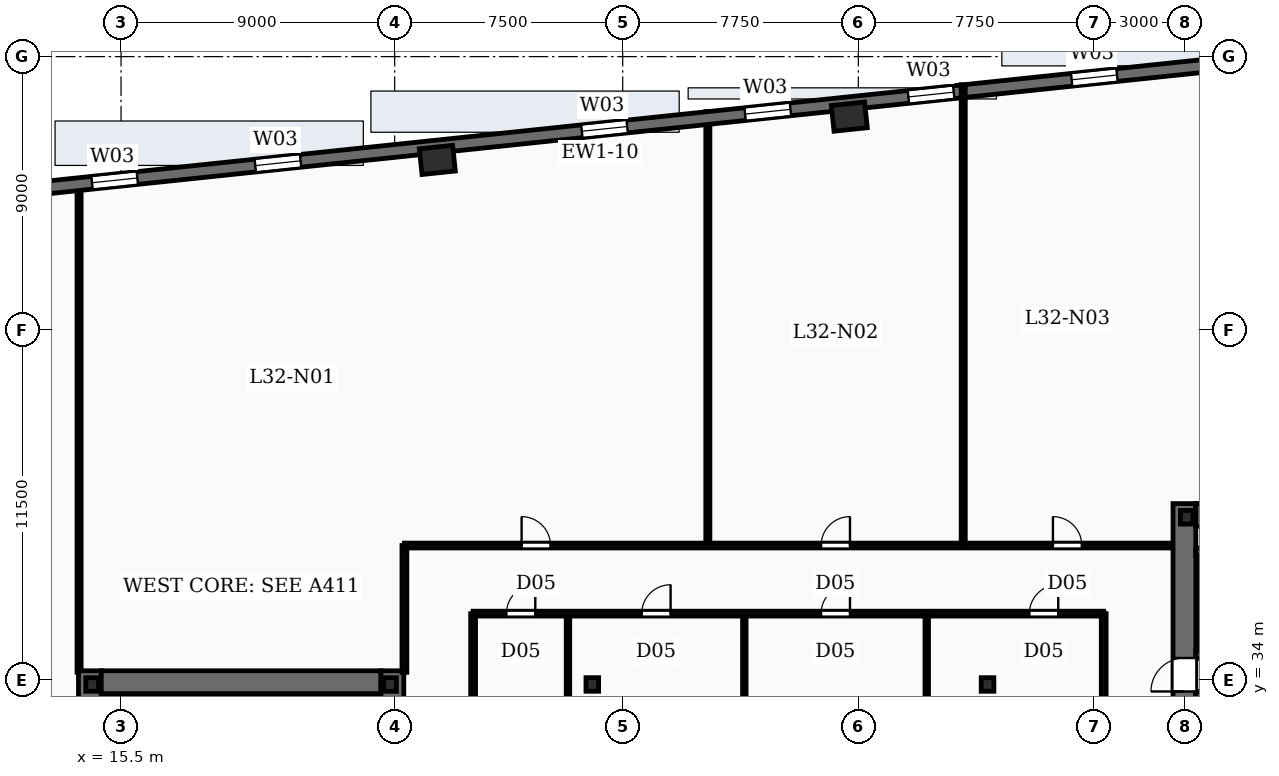
"""IFC4 building model, lengths in metres.
Left out: names, types, materials, properties, quantities, classifications, styles, units other than length and angle.
Written with IfcOpenShell. Run it as: python <this file> out.ifc"""

import sys

from ifc_helpers import new_model, si_unit, direction, frame, frame_2d, origin, origin_2d, place, context, subcontext, project, spatial, rectangle, i_section, extrude, element, fill, save


model = new_model("IFC4")
c1 = context("Model", 3, precision=1e-05, world=origin(), true_north=direction((0.0, 1.0)))
c2 = subcontext(c1, "Body", "Model", "MODEL_VIEW")
j1 = project(units=[si_unit("LENGTHUNIT", "METRE"), si_unit("PLANEANGLEUNIT", "RADIAN")], contexts=[c1])
p1 = place(None, origin())
s1 = spatial("IfcSite", under=j1, at=p1, CompositionType="ELEMENT")
p2 = place(p1, origin())
s2 = spatial("IfcBuilding", under=s1, at=p2, CompositionType="ELEMENT")
p3 = place(p2, frame((0.0, 0.0, 138.25)))
s3 = spatial("IfcBuildingStorey", under=s2, at=p3, CompositionType="ELEMENT", Elevation=138.25)
p4 = place(p3, frame((14.475, 19.0, -0.27), z_axis=(0.0, 0.0, 1.0), x_axis=(0.0, 1.0, 0.0)))
e1 = element("IfcWall", 1, at=p4, inside=s3, PredefinedType="SHEAR", context=c2, shape_type="SweptSolid", body=[
    extrude(rectangle(XDim=15.3, YDim=0.75, at=frame_2d((7.65, 0.0))), origin(), (0.0, 0.0, 1.0), 3.75),
])
p5 = place(p3, frame((24.425, 19.0, -0.27), z_axis=(0.0, 0.0, 1.0), x_axis=(0.0, 1.0, 0.0)))
e2 = element("IfcWall", 2, at=p5, inside=s3, PredefinedType="SHEAR", context=c2, shape_type="SweptSolid", body=[
    extrude(rectangle(XDim=15.3, YDim=0.75, at=frame_2d((7.65, 0.0))), origin(), (0.0, 0.0, 1.0), 3.75),
])
p6 = place(p5, frame((2.5, 0.0, 0.27)))
e3 = element("IfcOpeningElement", 3, at=p6, cuts=e2, PredefinedType="OPENING", context=c2, shape_type="SweptSolid", body=[
    extrude(rectangle(XDim=1.05, YDim=2.15, at=frame_2d((0.525, 1.075))), frame((0.0, 0.385, 0.0), z_axis=(0.0, -1.0, 0.0), x_axis=(1.0, 0.0, 0.0)), (0.0, 0.0, 1.0), 0.77),
])
p7 = place(p5, frame((7.0, 0.0, 0.27)))
e4 = element("IfcOpeningElement", 4, at=p7, cuts=e2, PredefinedType="OPENING", context=c2, shape_type="SweptSolid", body=[
    extrude(rectangle(XDim=1.05, YDim=2.15, at=frame_2d((0.525, 1.075))), frame((0.0, 0.385, 0.0), z_axis=(0.0, -1.0, 0.0), x_axis=(1.0, 0.0, 0.0)), (0.0, 0.0, 1.0), 0.77),
])
p8 = place(p3, frame((14.85, 33.925, -0.27), z_axis=(0.0, 0.0, 1.0), x_axis=(1.0, 0.0, 0.0)))
e5 = element("IfcWall", 5, at=p8, inside=s3, PredefinedType="SHEAR", context=c2, shape_type="SweptSolid", body=[
    extrude(rectangle(XDim=9.2, YDim=0.75, at=frame_2d((4.6, 0.0))), origin(), (0.0, 0.0, 1.0), 3.75),
])
p9 = place(p3, frame((50.475, 19.0, -0.27), z_axis=(0.0, 0.0, 1.0), x_axis=(0.0, 1.0, 0.0)))
e6 = element("IfcWall", 6, at=p9, inside=s3, PredefinedType="SHEAR", context=c2, shape_type="SweptSolid", body=[
    extrude(rectangle(XDim=20.8, YDim=0.75, at=frame_2d((10.4, 0.0))), origin(), (0.0, 0.0, 1.0), 3.75),
])
p10 = place(p9, frame((2.5, 0.0, 0.27)))
e7 = element("IfcOpeningElement", 7, at=p10, cuts=e6, PredefinedType="OPENING", context=c2, shape_type="SweptSolid", body=[
    extrude(rectangle(XDim=1.05, YDim=2.15, at=frame_2d((0.525, 1.075))), frame((0.0, 0.385, 0.0), z_axis=(0.0, -1.0, 0.0), x_axis=(1.0, 0.0, 0.0)), (0.0, 0.0, 1.0), 0.77),
])
p11 = place(p9, frame((8.65, 0.0, 0.27)))
e8 = element("IfcOpeningElement", 8, at=p11, cuts=e6, PredefinedType="OPENING", context=c2, shape_type="SweptSolid", body=[
    extrude(rectangle(XDim=1.05, YDim=2.15, at=frame_2d((0.525, 1.075))), frame((0.0, 0.385, 0.0), z_axis=(0.0, -1.0, 0.0), x_axis=(1.0, 0.0, 0.0)), (0.0, 0.0, 1.0), 0.77),
])
p12 = place(p9, frame((14.62, 0.0, 0.27)))
e9 = element("IfcOpeningElement", 9, at=p12, cuts=e6, PredefinedType="OPENING", context=c2, shape_type="SweptSolid", body=[
    extrude(rectangle(XDim=1.1, YDim=2.15, at=frame_2d((0.55, 1.075))), frame((0.0, 0.385, 0.0), z_axis=(0.0, -1.0, 0.0), x_axis=(1.0, 0.0, 0.0)), (0.0, 0.0, 1.0), 0.77),
])
p13 = place(p3, frame((50.85, 39.425, -0.27), z_axis=(0.0, 0.0, 1.0), x_axis=(1.0, 0.0, 0.0)))
e10 = element("IfcWall", 10, at=p13, inside=s3, PredefinedType="SHEAR", context=c2, shape_type="SweptSolid", body=[
    extrude(rectangle(XDim=9.2, YDim=0.75, at=frame_2d((4.6, 0.0))), origin(), (0.0, 0.0, 1.0), 3.75),
])
for number, where, z_axis, x_axis in (
    (11, (14.55, 33.85, -0.27), (0.0, 0.0, 1.0), (1.0, 0.0, 0.0)),
    (12, (24.35, 33.85, -0.27), (0.0, 0.0, 1.0), (1.0, 0.0, 0.0)),
    (13, (50.55, 39.35, -0.27), (0.0, 0.0, 1.0), (1.0, 0.0, 0.0)),
    (14, (31.0, 33.85, -0.27), (0.0, 0.0, 1.0), (1.0, 0.0, 0.0)),
    (15, (44.0, 33.85, -0.27), (0.0, 0.0, 1.0), (1.0, 0.0, 0.0)),
):
    element("IfcColumn", number, at=place(p3, frame(where, z_axis=z_axis, x_axis=x_axis)), inside=s3, PredefinedType="COLUMN", context=c2, shape_type="SweptSolid", body=[
        extrude(i_section(OverallWidth=0.416, OverallDepth=0.446, WebThickness=0.039, FlangeThickness=0.063, FilletRadius=0.02, at=origin_2d()), origin(), (0.0, 0.0, 1.0), 3.75),
    ])
for number, where, z_axis, x_axis in (
    (16, (39.453, 52.527, -0.27), (0.0, 0.0, 1.0), (0.995, 0.105, 0.0)),
    (17, (25.903, 51.103, -0.27), (0.0, 0.0, 1.0), (0.995, 0.105, 0.0)),
):
    element("IfcColumn", number, at=place(p3, frame(where, z_axis=z_axis, x_axis=x_axis)), inside=s3, PredefinedType="COLUMN", context=c2, shape_type="SweptSolid", body=[
        extrude(rectangle(XDim=1.1, YDim=0.85, at=origin_2d()), origin(), (0.0, 0.0, 1.0), 3.75),
    ])
p14 = place(p3, frame((11.958, 50.08, 0.0), z_axis=(0.0, 0.0, 1.0), x_axis=(0.994521823388, 0.104529148113, 0.0)))
e18 = element("IfcWall", 18, at=p14, inside=s3, PredefinedType="SOLIDWALL", context=c2, shape_type="SweptSolid", body=[
    extrude(rectangle(XDim=55.2, YDim=0.42, at=frame_2d((27.6, 0.0))), origin(), (0.0, 0.0, 1.0), 3.48),
])
p15 = place(p14, frame((2.6, 0.0, 0.88)))
e19 = element("IfcOpeningElement", 19, at=p15, cuts=e18, PredefinedType="OPENING", context=c2, shape_type="SweptSolid", body=[
    extrude(rectangle(XDim=1.5, YDim=2.05, at=frame_2d((0.75, 1.025))), frame((0.0, 0.22, 0.0), z_axis=(0.0, -1.0, 0.0), x_axis=(1.0, 0.0, 0.0)), (0.0, 0.0, 1.0), 0.44),
])
p16 = place(p14, frame((8.0, 0.0, 0.88)))
e20 = element("IfcOpeningElement", 20, at=p16, cuts=e18, PredefinedType="OPENING", context=c2, shape_type="SweptSolid", body=[
    extrude(rectangle(XDim=1.5, YDim=2.05, at=frame_2d((0.75, 1.025))), frame((0.0, 0.22, 0.0), z_axis=(0.0, -1.0, 0.0), x_axis=(1.0, 0.0, 0.0)), (0.0, 0.0, 1.0), 0.44),
])
p17 = place(p14, frame((18.8, 0.0, 0.88)))
e21 = element("IfcOpeningElement", 21, at=p17, cuts=e18, PredefinedType="OPENING", context=c2, shape_type="SweptSolid", body=[
    extrude(rectangle(XDim=1.5, YDim=2.05, at=frame_2d((0.75, 1.025))), frame((0.0, 0.22, 0.0), z_axis=(0.0, -1.0, 0.0), x_axis=(1.0, 0.0, 0.0)), (0.0, 0.0, 1.0), 0.44),
])
p18 = place(p14, frame((24.2, 0.0, 0.88)))
e22 = element("IfcOpeningElement", 22, at=p18, cuts=e18, PredefinedType="OPENING", context=c2, shape_type="SweptSolid", body=[
    extrude(rectangle(XDim=1.5, YDim=2.05, at=frame_2d((0.75, 1.025))), frame((0.0, 0.22, 0.0), z_axis=(0.0, -1.0, 0.0), x_axis=(1.0, 0.0, 0.0)), (0.0, 0.0, 1.0), 0.44),
])
p19 = place(p14, frame((29.6, 0.0, 0.88)))
e23 = element("IfcOpeningElement", 23, at=p19, cuts=e18, PredefinedType="OPENING", context=c2, shape_type="SweptSolid", body=[
    extrude(rectangle(XDim=1.5, YDim=2.05, at=frame_2d((0.75, 1.025))), frame((0.0, 0.22, 0.0), z_axis=(0.0, -1.0, 0.0), x_axis=(1.0, 0.0, 0.0)), (0.0, 0.0, 1.0), 0.44),
])
p20 = place(p14, frame((35.0, 0.0, 0.88)))
e24 = element("IfcOpeningElement", 24, at=p20, cuts=e18, PredefinedType="OPENING", context=c2, shape_type="SweptSolid", body=[
    extrude(rectangle(XDim=1.5, YDim=2.05, at=frame_2d((0.75, 1.025))), frame((0.0, 0.22, 0.0), z_axis=(0.0, -1.0, 0.0), x_axis=(1.0, 0.0, 0.0)), (0.0, 0.0, 1.0), 0.44),
])
p21 = place(p14, frame((45.8, 0.0, 0.88)))
e25 = element("IfcOpeningElement", 25, at=p21, cuts=e18, PredefinedType="OPENING", context=c2, shape_type="SweptSolid", body=[
    extrude(rectangle(XDim=1.5, YDim=2.05, at=frame_2d((0.75, 1.025))), frame((0.0, 0.22, 0.0), z_axis=(0.0, -1.0, 0.0), x_axis=(1.0, 0.0, 0.0)), (0.0, 0.0, 1.0), 0.44),
])
p22 = place(p3, frame((50.85, 33.5, 0.0), z_axis=(0.0, 0.0, 1.0), x_axis=(1.0, 0.0, 0.0)))
e26 = element("IfcWall", 26, at=p22, inside=s3, PredefinedType="SOLIDWALL", context=c2, shape_type="SweptSolid", body=[
    extrude(rectangle(XDim=9.2, YDim=0.24, at=frame_2d((4.6, 0.0))), origin(), (0.0, 0.0, 1.0), 3.48),
])
p23 = place(p3, frame((60.05, 34.83, 0.0), z_axis=(0.0, 0.0, 1.0), x_axis=(-1.0, 0.0, 0.0)))
e27 = element("IfcWall", 27, at=p23, inside=s3, PredefinedType="SOLIDWALL", context=c2, shape_type="SweptSolid", body=[
    extrude(rectangle(XDim=9.2, YDim=0.24, at=frame_2d((4.6, 0.0))), origin(), (0.0, 0.0, 1.0), 3.48),
])
p24 = place(p23, frame((7.57, 0.0, 0.0)))
e28 = element("IfcOpeningElement", 28, at=p24, cuts=e27, PredefinedType="OPENING", context=c2, shape_type="SweptSolid", body=[
    extrude(rectangle(XDim=1.1, YDim=2.15, at=frame_2d((0.55, 1.075))), frame((0.0, 0.13, 0.0), z_axis=(0.0, -1.0, 0.0), x_axis=(1.0, 0.0, 0.0)), (0.0, 0.0, 1.0), 0.26),
])
p25 = place(p3, frame((50.85, 38.22, 0.0), z_axis=(0.0, 0.0, 1.0), x_axis=(1.0, 0.0, 0.0)))
e29 = element("IfcWall", 29, at=p25, inside=s3, PredefinedType="SOLIDWALL", context=c2, shape_type="SweptSolid", body=[
    extrude(rectangle(XDim=9.2, YDim=0.24, at=frame_2d((4.6, 0.0))), origin(), (0.0, 0.0, 1.0), 3.48),
])
p26 = place(p3, frame((51.06, 34.95, 0.0), z_axis=(0.0, 0.0, 1.0), x_axis=(0.0, 1.0, 0.0)))
e30 = element("IfcWall", 30, at=p26, inside=s3, PredefinedType="SOLIDWALL", context=c2, shape_type="SweptSolid", body=[
    extrude(rectangle(XDim=3.15, YDim=0.24, at=frame_2d((1.575, 0.0))), origin(), (0.0, 0.0, 1.0), 3.48),
])
p27 = place(p3, frame((19.6, 32.37, 0.0), z_axis=(0.0, 0.0, 1.0), x_axis=(0.0, 1.0, 0.0)))
e31 = element("IfcWall", 31, at=p27, inside=s3, PredefinedType="SOLIDWALL", context=c2, shape_type="SweptSolid", body=[
    extrude(rectangle(XDim=1.13, YDim=0.2, at=frame_2d((0.565, 0.0))), origin(), (0.0, 0.0, 1.0), 3.48),
])
p28 = place(p3, frame((34.8, 38.42, 0.0), z_axis=(0.0, 0.0, 1.0), x_axis=(0.0, 1.0, 0.0)))
e32 = element("IfcWall", 32, at=p28, inside=s3, PredefinedType="PARTITIONING", context=c2, shape_type="SweptSolid", body=[
    extrude(rectangle(XDim=14.271, YDim=0.135, at=frame_2d((7.136, 0.0))), origin(), (0.0, 0.0, 1.0), 2.54),
])
p29 = place(p3, frame((43.2, 38.42, 0.0), z_axis=(0.0, 0.0, 1.0), x_axis=(0.0, 1.0, 0.0)))
e33 = element("IfcWall", 33, at=p29, inside=s3, PredefinedType="PARTITIONING", context=c2, shape_type="SweptSolid", body=[
    extrude(rectangle(XDim=15.155, YDim=0.135, at=frame_2d((7.577, 0.0))), origin(), (0.0, 0.0, 1.0), 2.54),
])
p30 = place(p3, frame((24.82, 34.25, 0.0), z_axis=(0.0, 0.0, 1.0), x_axis=(0.0, 1.0, 0.0)))
e34 = element("IfcWall", 34, at=p30, inside=s3, PredefinedType="PARTITIONING", context=c2, shape_type="SweptSolid", body=[
    extrude(rectangle(XDim=4.17, YDim=0.16, at=frame_2d((2.085, 0.0))), origin(), (0.0, 0.0, 1.0), 2.54),
])
p31 = place(p3, frame((14.12, 34.25, 0.0), z_axis=(0.0, 0.0, 1.0), x_axis=(0.0, 1.0, 0.0)))
e35 = element("IfcWall", 35, at=p31, inside=s3, PredefinedType="PARTITIONING", context=c2, shape_type="SweptSolid", body=[
    extrude(rectangle(XDim=16.027, YDim=0.135, at=frame_2d((8.013, 0.0))), origin(), (0.0, 0.0, 1.0), 2.54),
])
p32 = place(p3, frame((24.82, 38.42, 0.0), z_axis=(0.0, 0.0, 1.0), x_axis=(1.0, 0.0, 0.0)))
e36 = element("IfcWall", 36, at=p32, inside=s3, PredefinedType="PARTITIONING", context=c2, shape_type="SweptSolid", body=[
    extrude(rectangle(XDim=25.26, YDim=0.16, at=frame_2d((12.63, 0.0))), origin(), (0.0, 0.0, 1.0), 2.54),
])
p33 = place(p32, frame((3.855, 0.0, 0.0)))
e37 = element("IfcOpeningElement", 37, at=p33, cuts=e36, PredefinedType="OPENING", context=c2, shape_type="SweptSolid", body=[
    extrude(rectangle(XDim=0.95, YDim=2.15, at=frame_2d((0.475, 1.075))), frame((0.0, 0.09, 0.0), z_axis=(0.0, -1.0, 0.0), x_axis=(1.0, 0.0, 0.0)), (0.0, 0.0, 1.0), 0.18),
])
p34 = place(p32, frame((13.705, 0.0, 0.0)))
e38 = element("IfcOpeningElement", 38, at=p34, cuts=e36, PredefinedType="OPENING", context=c2, shape_type="SweptSolid", body=[
    extrude(rectangle(XDim=0.95, YDim=2.15, at=frame_2d((0.475, 1.075))), frame((0.0, 0.09, 0.0), z_axis=(0.0, -1.0, 0.0), x_axis=(1.0, 0.0, 0.0)), (0.0, 0.0, 1.0), 0.18),
])
p35 = place(p32, frame((21.33, 0.0, 0.0)))
e39 = element("IfcOpeningElement", 39, at=p35, cuts=e36, PredefinedType="OPENING", context=c2, shape_type="SweptSolid", body=[
    extrude(rectangle(XDim=0.95, YDim=2.15, at=frame_2d((0.475, 1.075))), frame((0.0, 0.09, 0.0), z_axis=(0.0, -1.0, 0.0), x_axis=(1.0, 0.0, 0.0)), (0.0, 0.0, 1.0), 0.18),
])
for number, where, z_axis, x_axis in (
    (40, (30.2, 15.38, 0.0), (0.0, 0.0, 1.0), (0.0, 1.0, 0.0)),
    (41, (36.0, 15.38, 0.0), (0.0, 0.0, 1.0), (0.0, 1.0, 0.0)),
    (42, (42.0, 15.38, 0.0), (0.0, 0.0, 1.0), (0.0, 1.0, 0.0)),
):
    element("IfcWall", number, at=place(p3, frame(where, z_axis=z_axis, x_axis=x_axis)), inside=s3, PredefinedType="PARTITIONING", context=c2, shape_type="SweptSolid", body=[
        extrude(rectangle(XDim=20.8, YDim=0.115, at=frame_2d((10.4, 0.0))), origin(), (0.0, 0.0, 1.0), 2.54),
    ])
p36 = place(p3, frame((27.08, 36.18, 0.0), z_axis=(0.0, 0.0, 1.0), x_axis=(1.0, 0.0, 0.0)))
e43 = element("IfcWall", 43, at=p36, inside=s3, PredefinedType="PARTITIONING", context=c2, shape_type="SweptSolid", body=[
    extrude(rectangle(XDim=20.74, YDim=0.16, at=frame_2d((10.37, 0.0))), origin(), (0.0, 0.0, 1.0), 2.54),
])
p37 = place(p36, frame((1.095, 0.0, 0.0)))
e44 = element("IfcOpeningElement", 44, at=p37, cuts=e43, PredefinedType="OPENING", context=c2, shape_type="SweptSolid", body=[
    extrude(rectangle(XDim=0.95, YDim=2.15, at=frame_2d((0.475, 1.075))), frame((0.0, 0.09, 0.0), z_axis=(0.0, -1.0, 0.0), x_axis=(1.0, 0.0, 0.0)), (0.0, 0.0, 1.0), 0.18),
])
p38 = place(p36, frame((5.545, 0.0, 0.0)))
e45 = element("IfcOpeningElement", 45, at=p38, cuts=e43, PredefinedType="OPENING", context=c2, shape_type="SweptSolid", body=[
    extrude(rectangle(XDim=0.95, YDim=2.15, at=frame_2d((0.475, 1.075))), frame((0.0, 0.09, 0.0), z_axis=(0.0, -1.0, 0.0), x_axis=(1.0, 0.0, 0.0)), (0.0, 0.0, 1.0), 0.18),
])
p39 = place(p36, frame((11.445, 0.0, 0.0)))
e46 = element("IfcOpeningElement", 46, at=p39, cuts=e43, PredefinedType="OPENING", context=c2, shape_type="SweptSolid", body=[
    extrude(rectangle(XDim=0.95, YDim=2.15, at=frame_2d((0.475, 1.075))), frame((0.0, 0.09, 0.0), z_axis=(0.0, -1.0, 0.0), x_axis=(1.0, 0.0, 0.0)), (0.0, 0.0, 1.0), 0.18),
])
p40 = place(p36, frame((18.295, 0.0, 0.0)))
e47 = element("IfcOpeningElement", 47, at=p40, cuts=e43, PredefinedType="OPENING", context=c2, shape_type="SweptSolid", body=[
    extrude(rectangle(XDim=0.95, YDim=2.15, at=frame_2d((0.475, 1.075))), frame((0.0, 0.09, 0.0), z_axis=(0.0, -1.0, 0.0), x_axis=(1.0, 0.0, 0.0)), (0.0, 0.0, 1.0), 0.18),
])
for number, where, z_axis, x_axis in (
    (48, (27.08, 15.38, 0.0), (0.0, 0.0, 1.0), (0.0, 1.0, 0.0)),
    (49, (47.82, 15.38, 0.0), (0.0, 0.0, 1.0), (0.0, 1.0, 0.0)),
):
    element("IfcWall", number, at=place(p3, frame(where, z_axis=z_axis, x_axis=x_axis)), inside=s3, PredefinedType="PARTITIONING", context=c2, shape_type="SweptSolid", body=[
        extrude(rectangle(XDim=20.8, YDim=0.16, at=frame_2d((10.4, 0.0))), origin(), (0.0, 0.0, 1.0), 2.54),
    ])
p41 = place(p15, origin())
e50 = element("IfcWindow", 50, at=p41, inside=s3, PartitioningType="SINGLE_PANEL", PredefinedType="WINDOW", context=c2, shape_type="SweptSolid", body=[
    extrude(rectangle(XDim=1.5, YDim=2.05, at=frame_2d((0.75, 1.025))), frame((0.0, 0.03, 0.0), z_axis=(0.0, -1.0, 0.0), x_axis=(1.0, 0.0, 0.0)), (0.0, 0.0, 1.0), 0.06),
])
fill(e19, e50)
p42 = place(p16, origin())
e51 = element("IfcWindow", 51, at=p42, inside=s3, PartitioningType="SINGLE_PANEL", PredefinedType="WINDOW", context=c2, shape_type="SweptSolid", body=[
    extrude(rectangle(XDim=1.5, YDim=2.05, at=frame_2d((0.75, 1.025))), frame((0.0, 0.03, 0.0), z_axis=(0.0, -1.0, 0.0), x_axis=(1.0, 0.0, 0.0)), (0.0, 0.0, 1.0), 0.06),
])
fill(e20, e51)
p43 = place(p17, origin())
e52 = element("IfcWindow", 52, at=p43, inside=s3, PartitioningType="SINGLE_PANEL", PredefinedType="WINDOW", context=c2, shape_type="SweptSolid", body=[
    extrude(rectangle(XDim=1.5, YDim=2.05, at=frame_2d((0.75, 1.025))), frame((0.0, 0.03, 0.0), z_axis=(0.0, -1.0, 0.0), x_axis=(1.0, 0.0, 0.0)), (0.0, 0.0, 1.0), 0.06),
])
fill(e21, e52)
p44 = place(p18, origin())
e53 = element("IfcWindow", 53, at=p44, inside=s3, PartitioningType="SINGLE_PANEL", PredefinedType="WINDOW", context=c2, shape_type="SweptSolid", body=[
    extrude(rectangle(XDim=1.5, YDim=2.05, at=frame_2d((0.75, 1.025))), frame((0.0, 0.03, 0.0), z_axis=(0.0, -1.0, 0.0), x_axis=(1.0, 0.0, 0.0)), (0.0, 0.0, 1.0), 0.06),
])
fill(e22, e53)
p45 = place(p19, origin())
e54 = element("IfcWindow", 54, at=p45, inside=s3, PartitioningType="SINGLE_PANEL", PredefinedType="WINDOW", context=c2, shape_type="SweptSolid", body=[
    extrude(rectangle(XDim=1.5, YDim=2.05, at=frame_2d((0.75, 1.025))), frame((0.0, 0.03, 0.0), z_axis=(0.0, -1.0, 0.0), x_axis=(1.0, 0.0, 0.0)), (0.0, 0.0, 1.0), 0.06),
])
fill(e23, e54)
p46 = place(p20, origin())
e55 = element("IfcWindow", 55, at=p46, inside=s3, PartitioningType="SINGLE_PANEL", PredefinedType="WINDOW", context=c2, shape_type="SweptSolid", body=[
    extrude(rectangle(XDim=1.5, YDim=2.05, at=frame_2d((0.75, 1.025))), frame((0.0, 0.03, 0.0), z_axis=(0.0, -1.0, 0.0), x_axis=(1.0, 0.0, 0.0)), (0.0, 0.0, 1.0), 0.06),
])
fill(e24, e55)
p47 = place(p12, origin())
e56 = element("IfcDoor", 56, at=p47, inside=s3, OperationType="SINGLE_SWING_LEFT", PredefinedType="DOOR", context=c2, shape_type="SweptSolid", body=[
    extrude(rectangle(XDim=1.1, YDim=2.15, at=frame_2d((0.55, 1.075))), frame((0.0, 0.025, 0.0), z_axis=(0.0, -1.0, 0.0), x_axis=(1.0, 0.0, 0.0)), (0.0, 0.0, 1.0), 0.05),
])
fill(e9, e56)
p48 = place(p33, origin())
e57 = element("IfcDoor", 57, at=p48, inside=s3, OperationType="SINGLE_SWING_LEFT", PredefinedType="DOOR", context=c2, shape_type="SweptSolid", body=[
    extrude(rectangle(XDim=0.95, YDim=2.15, at=frame_2d((0.475, 1.075))), frame((0.0, 0.025, 0.0), z_axis=(0.0, -1.0, 0.0), x_axis=(1.0, 0.0, 0.0)), (0.0, 0.0, 1.0), 0.05),
])
fill(e37, e57)
p49 = place(p34, origin())
e58 = element("IfcDoor", 58, at=p49, inside=s3, OperationType="SINGLE_SWING_RIGHT", PredefinedType="DOOR", context=c2, shape_type="SweptSolid", body=[
    extrude(rectangle(XDim=0.95, YDim=2.15, at=frame_2d((0.475, 1.075))), frame((0.0, 0.025, 0.0), z_axis=(0.0, -1.0, 0.0), x_axis=(1.0, 0.0, 0.0)), (0.0, 0.0, 1.0), 0.05),
])
fill(e38, e58)
p50 = place(p35, origin())
e59 = element("IfcDoor", 59, at=p50, inside=s3, OperationType="SINGLE_SWING_LEFT", PredefinedType="DOOR", context=c2, shape_type="SweptSolid", body=[
    extrude(rectangle(XDim=0.95, YDim=2.15, at=frame_2d((0.475, 1.075))), frame((0.0, 0.025, 0.0), z_axis=(0.0, -1.0, 0.0), x_axis=(1.0, 0.0, 0.0)), (0.0, 0.0, 1.0), 0.05),
])
fill(e39, e59)
p51 = place(p37, origin())
e60 = element("IfcDoor", 60, at=p51, inside=s3, OperationType="SINGLE_SWING_RIGHT", PredefinedType="DOOR", context=c2, shape_type="SweptSolid", body=[
    extrude(rectangle(XDim=0.95, YDim=2.15, at=frame_2d((0.475, 1.075))), frame((0.0, 0.025, 0.0), z_axis=(0.0, -1.0, 0.0), x_axis=(1.0, 0.0, 0.0)), (0.0, 0.0, 1.0), 0.05),
])
fill(e44, e60)
p52 = place(p38, origin())
e61 = element("IfcDoor", 61, at=p52, inside=s3, OperationType="SINGLE_SWING_RIGHT", PredefinedType="DOOR", context=c2, shape_type="SweptSolid", body=[
    extrude(rectangle(XDim=0.95, YDim=2.15, at=frame_2d((0.475, 1.075))), frame((0.0, 0.025, 0.0), z_axis=(0.0, -1.0, 0.0), x_axis=(1.0, 0.0, 0.0)), (0.0, 0.0, 1.0), 0.05),
])
fill(e45, e61)
p53 = place(p39, origin())
e62 = element("IfcDoor", 62, at=p53, inside=s3, OperationType="SINGLE_SWING_RIGHT", PredefinedType="DOOR", context=c2, shape_type="SweptSolid", body=[
    extrude(rectangle(XDim=0.95, YDim=2.15, at=frame_2d((0.475, 1.075))), frame((0.0, 0.025, 0.0), z_axis=(0.0, -1.0, 0.0), x_axis=(1.0, 0.0, 0.0)), (0.0, 0.0, 1.0), 0.05),
])
fill(e46, e62)
p54 = place(p40, origin())
e63 = element("IfcDoor", 63, at=p54, inside=s3, OperationType="SINGLE_SWING_RIGHT", PredefinedType="DOOR", context=c2, shape_type="SweptSolid", body=[
    extrude(rectangle(XDim=0.95, YDim=2.15, at=frame_2d((0.475, 1.075))), frame((0.0, 0.025, 0.0), z_axis=(0.0, -1.0, 0.0), x_axis=(1.0, 0.0, 0.0)), (0.0, 0.0, 1.0), 0.05),
])
fill(e47, e63)
save(model, sys.argv[1])
